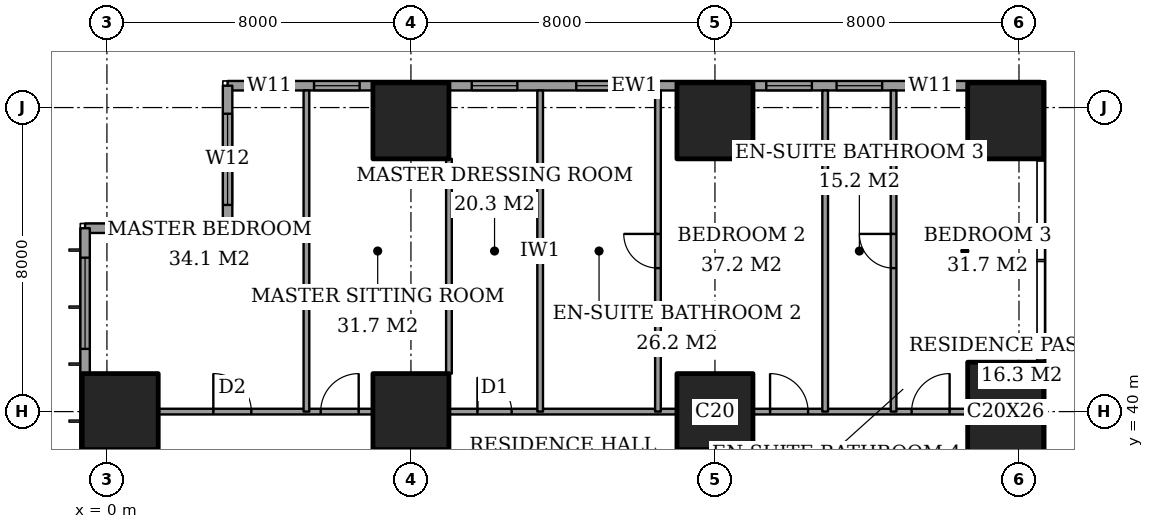
"""IFC4 building model, lengths in metres.
Left out: names, types, materials, properties, quantities, classifications, styles, units other than length and angle.
Written with IfcOpenShell. Run it as: python <this file> out.ifc"""

import sys

from ifc_helpers import new_model, si_unit, direction, frame, frame_2d, origin, origin_2d, place, context, subcontext, project, spatial, rectangle, extrude, element, fill, save


model = new_model("IFC4")
c1 = context("Model", 3, precision=1e-05, world=origin(), true_north=direction((0.0, 1.0)))
c2 = subcontext(c1, "Body", "Model", "MODEL_VIEW")
j1 = project(units=[si_unit("LENGTHUNIT", "METRE"), si_unit("PLANEANGLEUNIT", "RADIAN")], contexts=[c1])
p1 = place(None, origin())
s1 = spatial("IfcSite", under=j1, at=p1, CompositionType="ELEMENT")
p2 = place(p1, origin())
s2 = spatial("IfcBuilding", under=s1, at=p2, CompositionType="ELEMENT")
p3 = place(p2, frame((0.0, 0.0, 99.8)))
s3 = spatial("IfcBuildingStorey", under=s2, at=p3, CompositionType="ELEMENT", Elevation=99.8)
for number, where, z_axis, x_axis in (
    (1, (0.35, 40.0, 0.0), (0.0, 0.0, 1.0), (1.0, 0.0, 0.0)),
    (2, (8.0, 40.0, 0.0), (0.0, 0.0, 1.0), (1.0, 0.0, 0.0)),
    (3, (8.0, 47.65, 0.0), (0.0, 0.0, 1.0), (1.0, 0.0, 0.0)),
    (4, (16.0, 40.0, 0.0), (0.0, 0.0, 1.0), (1.0, 0.0, 0.0)),
    (5, (16.0, 47.65, 0.0), (0.0, 0.0, 1.0), (1.0, 0.0, 0.0)),
):
    element("IfcColumn", number, at=place(p3, frame(where, z_axis=z_axis, x_axis=x_axis)), inside=s3, PredefinedType="COLUMN", context=c2, shape_type="SweptSolid", body=[
        extrude(rectangle(XDim=2.0, YDim=2.0, at=origin_2d()), origin(), (0.0, 0.0, 1.0), 3.6),
    ])
p4 = place(p3, frame((23.65, 40.0, 0.0), z_axis=(0.0, 0.0, 1.0), x_axis=(1.0, 0.0, 0.0)))
e6 = element("IfcColumn", 6, at=p4, inside=s3, PredefinedType="COLUMN", context=c2, shape_type="SweptSolid", body=[
    extrude(rectangle(XDim=2.0, YDim=2.6, at=origin_2d()), origin(), (0.0, 0.0, 1.0), 3.6),
])
p5 = place(p3, frame((23.65, 47.65, 0.0), z_axis=(0.0, 0.0, 1.0), x_axis=(1.0, 0.0, 0.0)))
e7 = element("IfcColumn", 7, at=p5, inside=s3, PredefinedType="COLUMN", context=c2, shape_type="SweptSolid", body=[
    extrude(rectangle(XDim=2.0, YDim=2.0, at=origin_2d()), origin(), (0.0, 0.0, 1.0), 3.6),
])
p6 = place(p3, frame((24.575, 48.575, 0.0), z_axis=(0.0, 0.0, 1.0), x_axis=(-1.0, 0.0, 0.0)))
e8 = element("IfcWall", 8, at=p6, inside=s3, PredefinedType="SOLIDWALL", context=c2, shape_type="SweptSolid", body=[
    extrude(rectangle(XDim=21.4, YDim=0.25, at=frame_2d((10.7, 0.0))), origin(), (0.0, 0.0, 1.0), 3.6),
])
p7 = place(p6, frame((2.3, 0.0, 0.4)))
e9 = element("IfcOpeningElement", 9, at=p7, cuts=e8, PredefinedType="OPENING", context=c2, shape_type="SweptSolid", body=[
    extrude(rectangle(XDim=1.2, YDim=2.2, at=frame_2d((0.6, 1.1))), frame((0.0, 0.135, 0.0), z_axis=(0.0, -1.0, 0.0), x_axis=(1.0, 0.0, 0.0)), (0.0, 0.0, 1.0), 0.27),
])
p8 = place(p6, frame((4.175, 0.0, 0.4)))
e10 = element("IfcOpeningElement", 10, at=p8, cuts=e8, PredefinedType="OPENING", context=c2, shape_type="SweptSolid", body=[
    extrude(rectangle(XDim=1.2, YDim=2.2, at=frame_2d((0.6, 1.1))), frame((0.0, 0.135, 0.0), z_axis=(0.0, -1.0, 0.0), x_axis=(1.0, 0.0, 0.0)), (0.0, 0.0, 1.0), 0.27),
])
p9 = place(p6, frame((6.025, 0.0, 0.4)))
e11 = element("IfcOpeningElement", 11, at=p9, cuts=e8, PredefinedType="OPENING", context=c2, shape_type="SweptSolid", body=[
    extrude(rectangle(XDim=1.2, YDim=2.2, at=frame_2d((0.6, 1.1))), frame((0.0, 0.135, 0.0), z_axis=(0.0, -1.0, 0.0), x_axis=(1.0, 0.0, 0.0)), (0.0, 0.0, 1.0), 0.27),
])
p10 = place(p6, frame((11.025, 0.0, 0.4)))
e12 = element("IfcOpeningElement", 12, at=p10, cuts=e8, PredefinedType="OPENING", context=c2, shape_type="SweptSolid", body=[
    extrude(rectangle(XDim=1.2, YDim=2.2, at=frame_2d((0.6, 1.1))), frame((0.0, 0.135, 0.0), z_axis=(0.0, -1.0, 0.0), x_axis=(1.0, 0.0, 0.0)), (0.0, 0.0, 1.0), 0.27),
])
p11 = place(p6, frame((13.775, 0.0, 0.4)))
e13 = element("IfcOpeningElement", 13, at=p11, cuts=e8, PredefinedType="OPENING", context=c2, shape_type="SweptSolid", body=[
    extrude(rectangle(XDim=1.2, YDim=2.2, at=frame_2d((0.6, 1.1))), frame((0.0, 0.135, 0.0), z_axis=(0.0, -1.0, 0.0), x_axis=(1.0, 0.0, 0.0)), (0.0, 0.0, 1.0), 0.27),
])
p12 = place(p6, frame((17.925, 0.0, 0.4)))
e14 = element("IfcOpeningElement", 14, at=p12, cuts=e8, PredefinedType="OPENING", context=c2, shape_type="SweptSolid", body=[
    extrude(rectangle(XDim=1.2, YDim=2.2, at=frame_2d((0.6, 1.1))), frame((0.0, 0.135, 0.0), z_axis=(0.0, -1.0, 0.0), x_axis=(1.0, 0.0, 0.0)), (0.0, 0.0, 1.0), 0.27),
])
p13 = place(p6, frame((19.7, 0.0, 0.4)))
e15 = element("IfcOpeningElement", 15, at=p13, cuts=e8, PredefinedType="OPENING", context=c2, shape_type="SweptSolid", body=[
    extrude(rectangle(XDim=1.2, YDim=2.2, at=frame_2d((0.6, 1.1))), frame((0.0, 0.135, 0.0), z_axis=(0.0, -1.0, 0.0), x_axis=(1.0, 0.0, 0.0)), (0.0, 0.0, 1.0), 0.27),
])
p14 = place(p3, frame((3.175, 48.575, 0.0), z_axis=(0.0, 0.0, 1.0), x_axis=(0.0, -1.0, 0.0)))
e16 = element("IfcWall", 16, at=p14, inside=s3, PredefinedType="SOLIDWALL", context=c2, shape_type="SweptSolid", body=[
    extrude(rectangle(XDim=3.75, YDim=0.25, at=frame_2d((1.875, 0.0))), origin(), (0.0, 0.0, 1.0), 3.6),
])
p15 = place(p14, frame((0.738, 0.0, 0.4)))
e17 = element("IfcOpeningElement", 17, at=p15, cuts=e16, PredefinedType="OPENING", context=c2, shape_type="SweptSolid", body=[
    extrude(rectangle(XDim=2.4, YDim=2.2, at=frame_2d((1.2, 1.1))), frame((0.0, 0.135, 0.0), z_axis=(0.0, -1.0, 0.0), x_axis=(1.0, 0.0, 0.0)), (0.0, 0.0, 1.0), 0.27),
])
p16 = place(p3, frame((3.175, 44.825, 0.0), z_axis=(0.0, 0.0, 1.0), x_axis=(-1.0, 0.0, 0.0)))
e18 = element("IfcWall", 18, at=p16, inside=s3, PredefinedType="SOLIDWALL", context=c2, shape_type="SweptSolid", body=[
    extrude(rectangle(XDim=3.75, YDim=0.25, at=frame_2d((1.875, 0.0))), origin(), (0.0, 0.0, 1.0), 3.6),
])
p17 = place(p16, frame((0.613, 0.0, 0.4)))
e19 = element("IfcOpeningElement", 19, at=p17, cuts=e18, PredefinedType="OPENING", context=c2, shape_type="SweptSolid", body=[
    extrude(rectangle(XDim=2.4, YDim=2.2, at=frame_2d((1.2, 1.1))), frame((0.0, 0.135, 0.0), z_axis=(0.0, -1.0, 0.0), x_axis=(1.0, 0.0, 0.0)), (0.0, 0.0, 1.0), 0.27),
])
p18 = place(p3, frame((-0.575, 44.825, 0.0), z_axis=(0.0, 0.0, 1.0), x_axis=(0.0, -1.0, 0.0)))
e20 = element("IfcWall", 20, at=p18, inside=s3, PredefinedType="SOLIDWALL", context=c2, shape_type="SweptSolid", body=[
    extrude(rectangle(XDim=41.65, YDim=0.25, at=frame_2d((20.825, 0.0))), origin(), (0.0, 0.0, 1.0), 3.6),
])
p19 = place(p18, frame((0.775, 0.0, 0.4)))
e21 = element("IfcOpeningElement", 21, at=p19, cuts=e20, PredefinedType="OPENING", context=c2, shape_type="SweptSolid", body=[
    extrude(rectangle(XDim=2.4, YDim=2.2, at=frame_2d((1.2, 1.1))), frame((0.0, 0.135, 0.0), z_axis=(0.0, -1.0, 0.0), x_axis=(1.0, 0.0, 0.0)), (0.0, 0.0, 1.0), 0.27),
])
p20 = place(p18, frame((6.1, 0.0, 0.4)))
e22 = element("IfcOpeningElement", 22, at=p20, cuts=e20, PredefinedType="OPENING", context=c2, shape_type="SweptSolid", body=[
    extrude(rectangle(XDim=1.2, YDim=2.2, at=frame_2d((0.6, 1.1))), frame((0.0, 0.135, 0.0), z_axis=(0.0, -1.0, 0.0), x_axis=(1.0, 0.0, 0.0)), (0.0, 0.0, 1.0), 0.27),
])
p21 = place(p18, frame((8.425, 0.0, 0.4)))
e23 = element("IfcOpeningElement", 23, at=p21, cuts=e20, PredefinedType="OPENING", context=c2, shape_type="SweptSolid", body=[
    extrude(rectangle(XDim=2.4, YDim=2.2, at=frame_2d((1.2, 1.1))), frame((0.0, 0.135, 0.0), z_axis=(0.0, -1.0, 0.0), x_axis=(1.0, 0.0, 0.0)), (0.0, 0.0, 1.0), 0.27),
])
p22 = place(p18, frame((15.625, 0.0, 0.4)))
e24 = element("IfcOpeningElement", 24, at=p22, cuts=e20, PredefinedType="OPENING", context=c2, shape_type="SweptSolid", body=[
    extrude(rectangle(XDim=2.4, YDim=2.2, at=frame_2d((1.2, 1.1))), frame((0.0, 0.135, 0.0), z_axis=(0.0, -1.0, 0.0), x_axis=(1.0, 0.0, 0.0)), (0.0, 0.0, 1.0), 0.27),
])
p23 = place(p18, frame((23.625, 0.0, 0.4)))
e25 = element("IfcOpeningElement", 25, at=p23, cuts=e20, PredefinedType="OPENING", context=c2, shape_type="SweptSolid", body=[
    extrude(rectangle(XDim=2.4, YDim=2.2, at=frame_2d((1.2, 1.1))), frame((0.0, 0.135, 0.0), z_axis=(0.0, -1.0, 0.0), x_axis=(1.0, 0.0, 0.0)), (0.0, 0.0, 1.0), 0.27),
])
p24 = place(p18, frame((30.725, 0.0, 0.4)))
e26 = element("IfcOpeningElement", 26, at=p24, cuts=e20, PredefinedType="OPENING", context=c2, shape_type="SweptSolid", body=[
    extrude(rectangle(XDim=2.4, YDim=2.2, at=frame_2d((1.2, 1.1))), frame((0.0, 0.135, 0.0), z_axis=(0.0, -1.0, 0.0), x_axis=(1.0, 0.0, 0.0)), (0.0, 0.0, 1.0), 0.27),
])
p25 = place(p18, frame((34.325, 0.0, 0.4)))
e27 = element("IfcOpeningElement", 27, at=p25, cuts=e20, PredefinedType="OPENING", context=c2, shape_type="SweptSolid", body=[
    extrude(rectangle(XDim=1.2, YDim=2.2, at=frame_2d((0.6, 1.1))), frame((0.0, 0.135, 0.0), z_axis=(0.0, -1.0, 0.0), x_axis=(1.0, 0.0, 0.0)), (0.0, 0.0, 1.0), 0.27),
])
p26 = place(p18, frame((38.475, 0.0, 0.4)))
e28 = element("IfcOpeningElement", 28, at=p26, cuts=e20, PredefinedType="OPENING", context=c2, shape_type="SweptSolid", body=[
    extrude(rectangle(XDim=2.4, YDim=2.2, at=frame_2d((1.2, 1.1))), frame((0.0, 0.135, 0.0), z_axis=(0.0, -1.0, 0.0), x_axis=(1.0, 0.0, 0.0)), (0.0, 0.0, 1.0), 0.27),
])
p27 = place(p3, frame((1.35, 40.0, 0.0), z_axis=(0.0, 0.0, 1.0), x_axis=(1.0, 0.0, 0.0)))
e29 = element("IfcWall", 29, at=p27, inside=s3, PredefinedType="PARTITIONING", context=c2, shape_type="SweptSolid", body=[
    extrude(rectangle(XDim=5.65, YDim=0.15, at=frame_2d((2.825, 0.0))), origin(), (0.0, 0.0, 1.0), 3.35),
])
p28 = place(p27, frame((1.45, 0.0, 0.0)))
e30 = element("IfcOpeningElement", 30, at=p28, cuts=e29, PredefinedType="OPENING", context=c2, shape_type="SweptSolid", body=[
    extrude(rectangle(XDim=1.0, YDim=2.1, at=frame_2d((0.5, 1.05))), frame((0.0, 0.085, 0.0), z_axis=(0.0, -1.0, 0.0), x_axis=(1.0, 0.0, 0.0)), (0.0, 0.0, 1.0), 0.17),
])
p29 = place(p27, frame((4.275, 0.0, 0.0)))
e31 = element("IfcOpeningElement", 31, at=p29, cuts=e29, PredefinedType="OPENING", context=c2, shape_type="SweptSolid", body=[
    extrude(rectangle(XDim=1.0, YDim=2.1, at=frame_2d((0.5, 1.05))), frame((0.0, 0.085, 0.0), z_axis=(0.0, -1.0, 0.0), x_axis=(1.0, 0.0, 0.0)), (0.0, 0.0, 1.0), 0.17),
])
p30 = place(p3, frame((9.0, 40.0, 0.0), z_axis=(0.0, 0.0, 1.0), x_axis=(1.0, 0.0, 0.0)))
e32 = element("IfcWall", 32, at=p30, inside=s3, PredefinedType="PARTITIONING", context=c2, shape_type="SweptSolid", body=[
    extrude(rectangle(XDim=6.0, YDim=0.15, at=frame_2d((3.0, 0.0))), origin(), (0.0, 0.0, 1.0), 3.35),
])
p31 = place(p30, frame((0.75, 0.0, 0.0)))
e33 = element("IfcOpeningElement", 33, at=p31, cuts=e32, PredefinedType="OPENING", context=c2, shape_type="SweptSolid", body=[
    extrude(rectangle(XDim=0.9, YDim=2.1, at=frame_2d((0.45, 1.05))), frame((0.0, 0.085, 0.0), z_axis=(0.0, -1.0, 0.0), x_axis=(1.0, 0.0, 0.0)), (0.0, 0.0, 1.0), 0.17),
])
p32 = place(p3, frame((17.0, 40.0, 0.0), z_axis=(0.0, 0.0, 1.0), x_axis=(1.0, 0.0, 0.0)))
e34 = element("IfcWall", 34, at=p32, inside=s3, PredefinedType="PARTITIONING", context=c2, shape_type="SweptSolid", body=[
    extrude(rectangle(XDim=5.65, YDim=0.15, at=frame_2d((2.825, 0.0))), origin(), (0.0, 0.0, 1.0), 3.35),
])
p33 = place(p32, frame((0.45, 0.0, 0.0)))
e35 = element("IfcOpeningElement", 35, at=p33, cuts=e34, PredefinedType="OPENING", context=c2, shape_type="SweptSolid", body=[
    extrude(rectangle(XDim=1.0, YDim=2.1, at=frame_2d((0.5, 1.05))), frame((0.0, 0.085, 0.0), z_axis=(0.0, -1.0, 0.0), x_axis=(1.0, 0.0, 0.0)), (0.0, 0.0, 1.0), 0.17),
])
p34 = place(p32, frame((4.175, 0.0, 0.0)))
e36 = element("IfcOpeningElement", 36, at=p34, cuts=e34, PredefinedType="OPENING", context=c2, shape_type="SweptSolid", body=[
    extrude(rectangle(XDim=1.0, YDim=2.1, at=frame_2d((0.5, 1.05))), frame((0.0, 0.085, 0.0), z_axis=(0.0, -1.0, 0.0), x_axis=(1.0, 0.0, 0.0)), (0.0, 0.0, 1.0), 0.17),
])
p35 = place(p3, frame((5.25, 40.0, 0.0), z_axis=(0.0, 0.0, 1.0), x_axis=(0.0, 1.0, 0.0)))
e37 = element("IfcWall", 37, at=p35, inside=s3, PredefinedType="PARTITIONING", context=c2, shape_type="SweptSolid", body=[
    extrude(rectangle(XDim=8.45, YDim=0.15, at=frame_2d((4.225, 0.0))), origin(), (0.0, 0.0, 1.0), 3.35),
])
p36 = place(p3, frame((9.0, 41.0, 0.0), z_axis=(0.0, 0.0, 1.0), x_axis=(0.0, 1.0, 0.0)))
e38 = element("IfcWall", 38, at=p36, inside=s3, PredefinedType="PARTITIONING", context=c2, shape_type="SweptSolid", body=[
    extrude(rectangle(XDim=5.65, YDim=0.15, at=frame_2d((2.825, 0.0))), origin(), (0.0, 0.0, 1.0), 3.35),
])
p37 = place(p3, frame((11.4, 40.0, 0.0), z_axis=(0.0, 0.0, 1.0), x_axis=(0.0, 1.0, 0.0)))
e39 = element("IfcWall", 39, at=p37, inside=s3, PredefinedType="PARTITIONING", context=c2, shape_type="SweptSolid", body=[
    extrude(rectangle(XDim=8.45, YDim=0.15, at=frame_2d((4.225, 0.0))), origin(), (0.0, 0.0, 1.0), 3.35),
])
p38 = place(p3, frame((14.5, 40.0, 0.0), z_axis=(0.0, 0.0, 1.0), x_axis=(0.0, 1.0, 0.0)))
e40 = element("IfcWall", 40, at=p38, inside=s3, PredefinedType="PARTITIONING", context=c2, shape_type="SweptSolid", body=[
    extrude(rectangle(XDim=8.45, YDim=0.15, at=frame_2d((4.225, 0.0))), origin(), (0.0, 0.0, 1.0), 3.35),
])
p39 = place(p38, frame((3.775, 0.0, 0.0)))
e41 = element("IfcOpeningElement", 41, at=p39, cuts=e40, PredefinedType="OPENING", context=c2, shape_type="SweptSolid", body=[
    extrude(rectangle(XDim=0.9, YDim=2.1, at=frame_2d((0.45, 1.05))), frame((0.0, 0.085, 0.0), z_axis=(0.0, -1.0, 0.0), x_axis=(1.0, 0.0, 0.0)), (0.0, 0.0, 1.0), 0.17),
])
p40 = place(p3, frame((18.9, 40.0, 0.0), z_axis=(0.0, 0.0, 1.0), x_axis=(0.0, 1.0, 0.0)))
e42 = element("IfcWall", 42, at=p40, inside=s3, PredefinedType="PARTITIONING", context=c2, shape_type="SweptSolid", body=[
    extrude(rectangle(XDim=8.45, YDim=0.15, at=frame_2d((4.225, 0.0))), origin(), (0.0, 0.0, 1.0), 3.35),
])
p41 = place(p3, frame((20.7, 40.0, 0.0), z_axis=(0.0, 0.0, 1.0), x_axis=(0.0, 1.0, 0.0)))
e43 = element("IfcWall", 43, at=p41, inside=s3, PredefinedType="PARTITIONING", context=c2, shape_type="SweptSolid", body=[
    extrude(rectangle(XDim=8.45, YDim=0.15, at=frame_2d((4.225, 0.0))), origin(), (0.0, 0.0, 1.0), 3.35),
])
p42 = place(p41, frame((3.775, 0.0, 0.0)))
e44 = element("IfcOpeningElement", 44, at=p42, cuts=e43, PredefinedType="OPENING", context=c2, shape_type="SweptSolid", body=[
    extrude(rectangle(XDim=0.9, YDim=2.1, at=frame_2d((0.45, 1.05))), frame((0.0, 0.085, 0.0), z_axis=(0.0, -1.0, 0.0), x_axis=(1.0, 0.0, 0.0)), (0.0, 0.0, 1.0), 0.17),
])
p43 = place(p7, origin())
e45 = element("IfcWindow", 45, at=p43, inside=s3, PartitioningType="SINGLE_PANEL", PredefinedType="WINDOW", context=c2, shape_type="SweptSolid", body=[
    extrude(rectangle(XDim=1.2, YDim=2.2, at=frame_2d((0.6, 1.1))), frame((0.0, 0.03, 0.0), z_axis=(0.0, -1.0, 0.0), x_axis=(1.0, 0.0, 0.0)), (0.0, 0.0, 1.0), 0.06),
])
fill(e9, e45)
p44 = place(p8, origin())
e46 = element("IfcWindow", 46, at=p44, inside=s3, PartitioningType="SINGLE_PANEL", PredefinedType="WINDOW", context=c2, shape_type="SweptSolid", body=[
    extrude(rectangle(XDim=1.2, YDim=2.2, at=frame_2d((0.6, 1.1))), frame((0.0, 0.03, 0.0), z_axis=(0.0, -1.0, 0.0), x_axis=(1.0, 0.0, 0.0)), (0.0, 0.0, 1.0), 0.06),
])
fill(e10, e46)
p45 = place(p9, origin())
e47 = element("IfcWindow", 47, at=p45, inside=s3, PartitioningType="SINGLE_PANEL", PredefinedType="WINDOW", context=c2, shape_type="SweptSolid", body=[
    extrude(rectangle(XDim=1.2, YDim=2.2, at=frame_2d((0.6, 1.1))), frame((0.0, 0.03, 0.0), z_axis=(0.0, -1.0, 0.0), x_axis=(1.0, 0.0, 0.0)), (0.0, 0.0, 1.0), 0.06),
])
fill(e11, e47)
p46 = place(p10, origin())
e48 = element("IfcWindow", 48, at=p46, inside=s3, PartitioningType="SINGLE_PANEL", PredefinedType="WINDOW", context=c2, shape_type="SweptSolid", body=[
    extrude(rectangle(XDim=1.2, YDim=2.2, at=frame_2d((0.6, 1.1))), frame((0.0, 0.03, 0.0), z_axis=(0.0, -1.0, 0.0), x_axis=(1.0, 0.0, 0.0)), (0.0, 0.0, 1.0), 0.06),
])
fill(e12, e48)
p47 = place(p11, origin())
e49 = element("IfcWindow", 49, at=p47, inside=s3, PartitioningType="SINGLE_PANEL", PredefinedType="WINDOW", context=c2, shape_type="SweptSolid", body=[
    extrude(rectangle(XDim=1.2, YDim=2.2, at=frame_2d((0.6, 1.1))), frame((0.0, 0.03, 0.0), z_axis=(0.0, -1.0, 0.0), x_axis=(1.0, 0.0, 0.0)), (0.0, 0.0, 1.0), 0.06),
])
fill(e13, e49)
p48 = place(p12, origin())
e50 = element("IfcWindow", 50, at=p48, inside=s3, PartitioningType="SINGLE_PANEL", PredefinedType="WINDOW", context=c2, shape_type="SweptSolid", body=[
    extrude(rectangle(XDim=1.2, YDim=2.2, at=frame_2d((0.6, 1.1))), frame((0.0, 0.03, 0.0), z_axis=(0.0, -1.0, 0.0), x_axis=(1.0, 0.0, 0.0)), (0.0, 0.0, 1.0), 0.06),
])
fill(e14, e50)
p49 = place(p13, origin())
e51 = element("IfcWindow", 51, at=p49, inside=s3, PartitioningType="SINGLE_PANEL", PredefinedType="WINDOW", context=c2, shape_type="SweptSolid", body=[
    extrude(rectangle(XDim=1.2, YDim=2.2, at=frame_2d((0.6, 1.1))), frame((0.0, 0.03, 0.0), z_axis=(0.0, -1.0, 0.0), x_axis=(1.0, 0.0, 0.0)), (0.0, 0.0, 1.0), 0.06),
])
fill(e15, e51)
p50 = place(p15, origin())
e52 = element("IfcWindow", 52, at=p50, inside=s3, PartitioningType="SINGLE_PANEL", PredefinedType="WINDOW", context=c2, shape_type="SweptSolid", body=[
    extrude(rectangle(XDim=2.4, YDim=2.2, at=frame_2d((1.2, 1.1))), frame((0.0, 0.03, 0.0), z_axis=(0.0, -1.0, 0.0), x_axis=(1.0, 0.0, 0.0)), (0.0, 0.0, 1.0), 0.06),
])
fill(e17, e52)
p51 = place(p17, origin())
e53 = element("IfcWindow", 53, at=p51, inside=s3, PartitioningType="SINGLE_PANEL", PredefinedType="WINDOW", context=c2, shape_type="SweptSolid", body=[
    extrude(rectangle(XDim=2.4, YDim=2.2, at=frame_2d((1.2, 1.1))), frame((0.0, 0.03, 0.0), z_axis=(0.0, -1.0, 0.0), x_axis=(1.0, 0.0, 0.0)), (0.0, 0.0, 1.0), 0.06),
])
fill(e19, e53)
p52 = place(p19, origin())
e54 = element("IfcWindow", 54, at=p52, inside=s3, PartitioningType="SINGLE_PANEL", PredefinedType="WINDOW", context=c2, shape_type="SweptSolid", body=[
    extrude(rectangle(XDim=2.4, YDim=2.2, at=frame_2d((1.2, 1.1))), frame((0.0, 0.03, 0.0), z_axis=(0.0, -1.0, 0.0), x_axis=(1.0, 0.0, 0.0)), (0.0, 0.0, 1.0), 0.06),
])
fill(e21, e54)
p53 = place(p28, origin())
e55 = element("IfcDoor", 55, at=p53, inside=s3, OperationType="SINGLE_SWING_RIGHT", PredefinedType="DOOR", context=c2, shape_type="SweptSolid", body=[
    extrude(rectangle(XDim=1.0, YDim=2.1, at=frame_2d((0.5, 1.05))), frame((0.0, 0.025, 0.0), z_axis=(0.0, -1.0, 0.0), x_axis=(1.0, 0.0, 0.0)), (0.0, 0.0, 1.0), 0.05),
])
fill(e30, e55)
p54 = place(p29, origin())
e56 = element("IfcDoor", 56, at=p54, inside=s3, OperationType="SINGLE_SWING_LEFT", PredefinedType="DOOR", context=c2, shape_type="SweptSolid", body=[
    extrude(rectangle(XDim=1.0, YDim=2.1, at=frame_2d((0.5, 1.05))), frame((0.0, 0.025, 0.0), z_axis=(0.0, -1.0, 0.0), x_axis=(1.0, 0.0, 0.0)), (0.0, 0.0, 1.0), 0.05),
])
fill(e31, e56)
p55 = place(p31, origin())
e57 = element("IfcDoor", 57, at=p55, inside=s3, OperationType="SINGLE_SWING_RIGHT", PredefinedType="DOOR", context=c2, shape_type="SweptSolid", body=[
    extrude(rectangle(XDim=0.9, YDim=2.1, at=frame_2d((0.45, 1.05))), frame((0.0, 0.025, 0.0), z_axis=(0.0, -1.0, 0.0), x_axis=(1.0, 0.0, 0.0)), (0.0, 0.0, 1.0), 0.05),
])
fill(e33, e57)
p56 = place(p39, origin())
e58 = element("IfcDoor", 58, at=p56, inside=s3, OperationType="SINGLE_SWING_LEFT", PredefinedType="DOOR", context=c2, shape_type="SweptSolid", body=[
    extrude(rectangle(XDim=0.9, YDim=2.1, at=frame_2d((0.45, 1.05))), frame((0.0, 0.025, 0.0), z_axis=(0.0, -1.0, 0.0), x_axis=(1.0, 0.0, 0.0)), (0.0, 0.0, 1.0), 0.05),
])
fill(e41, e58)
p57 = place(p33, origin())
e59 = element("IfcDoor", 59, at=p57, inside=s3, OperationType="SINGLE_SWING_RIGHT", PredefinedType="DOOR", context=c2, shape_type="SweptSolid", body=[
    extrude(rectangle(XDim=1.0, YDim=2.1, at=frame_2d((0.5, 1.05))), frame((0.0, 0.025, 0.0), z_axis=(0.0, -1.0, 0.0), x_axis=(1.0, 0.0, 0.0)), (0.0, 0.0, 1.0), 0.05),
])
fill(e35, e59)
p58 = place(p42, origin())
e60 = element("IfcDoor", 60, at=p58, inside=s3, OperationType="SINGLE_SWING_LEFT", PredefinedType="DOOR", context=c2, shape_type="SweptSolid", body=[
    extrude(rectangle(XDim=0.9, YDim=2.1, at=frame_2d((0.45, 1.05))), frame((0.0, 0.025, 0.0), z_axis=(0.0, -1.0, 0.0), x_axis=(1.0, 0.0, 0.0)), (0.0, 0.0, 1.0), 0.05),
])
fill(e44, e60)
p59 = place(p34, origin())
e61 = element("IfcDoor", 61, at=p59, inside=s3, OperationType="SINGLE_SWING_LEFT", PredefinedType="DOOR", context=c2, shape_type="SweptSolid", body=[
    extrude(rectangle(XDim=1.0, YDim=2.1, at=frame_2d((0.5, 1.05))), frame((0.0, 0.025, 0.0), z_axis=(0.0, -1.0, 0.0), x_axis=(1.0, 0.0, 0.0)), (0.0, 0.0, 1.0), 0.05),
])
fill(e36, e61)
save(model, sys.argv[1])
